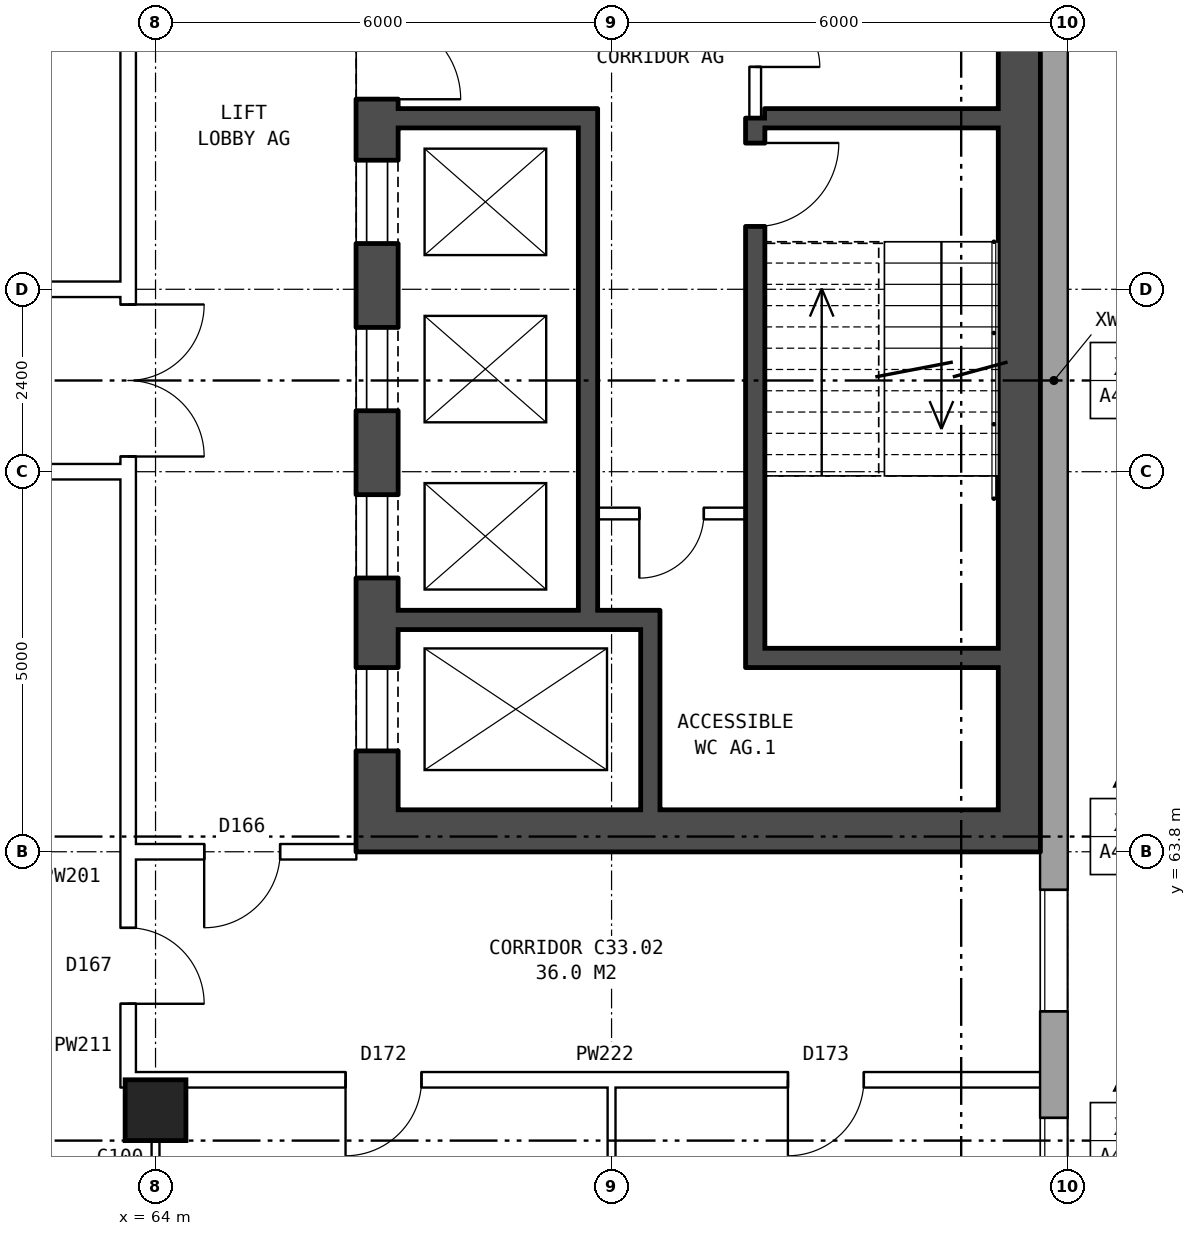
"""IFC4 building model, lengths in metres.
Left out: names, types, materials, properties, quantities, classifications, styles, units other than length and angle.
Written with IfcOpenShell. Run it as: python <this file> out.ifc"""

import sys

from ifc_helpers import new_model, si_unit, direction, frame, frame_2d, origin, origin_2d, place, context, subcontext, project, spatial, rectangle, extrude, element, fill, save


model = new_model("IFC4")
c1 = context("Model", 3, precision=1e-05, world=origin(), true_north=direction((0.0, 1.0)))
c2 = subcontext(c1, "Body", "Model", "MODEL_VIEW")
j1 = project(units=[si_unit("LENGTHUNIT", "METRE"), si_unit("PLANEANGLEUNIT", "RADIAN")], contexts=[c1])
p1 = place(None, origin())
s1 = spatial("IfcSite", under=j1, at=p1, CompositionType="ELEMENT")
p2 = place(p1, origin())
s2 = spatial("IfcBuilding", under=s1, at=p2, CompositionType="ELEMENT")
p3 = place(p2, frame((0.0, 0.0, 119.5)))
s3 = spatial("IfcBuildingStorey", under=s2, at=p3, CompositionType="ELEMENT", Elevation=119.5)
p4 = place(p3, frame((64.0, 60.4, 0.0), z_axis=(0.0, 0.0, 1.0), x_axis=(1.0, 0.0, 0.0)))
e1 = element("IfcColumn", 1, at=p4, inside=s3, PredefinedType="COLUMN", context=c2, shape_type="SweptSolid", body=[
    extrude(rectangle(XDim=0.8, YDim=0.8, at=origin_2d()), origin(), (0.0, 0.0, 1.0), 3.6),
])
p5 = place(p3, frame((75.82, 57.075, 0.0), z_axis=(0.0, 0.0, 1.0), x_axis=(0.0, 1.0, 0.0)))
e2 = element("IfcWall", 2, at=p5, inside=s3, PredefinedType="STANDARD", context=c2, shape_type="SweptSolid", body=[
    extrude(rectangle(XDim=25.851, YDim=0.36, at=frame_2d((12.925, 0.0))), origin(), (0.0, 0.0, 1.0), 3.6),
])
p6 = place(p5, frame((1.625, 0.0, 0.8)))
e3 = element("IfcOpeningElement", 3, at=p6, cuts=e2, PredefinedType="OPENING", context=c2, shape_type="SweptSolid", body=[
    extrude(rectangle(XDim=1.6, YDim=1.8, at=frame_2d((0.8, 0.9))), frame((0.0, 0.19, 0.0), z_axis=(0.0, -1.0, 0.0), x_axis=(1.0, 0.0, 0.0)), (0.0, 0.0, 1.0), 0.38),
])
p7 = place(p5, frame((4.625, 0.0, 0.8)))
e4 = element("IfcOpeningElement", 4, at=p7, cuts=e2, PredefinedType="OPENING", context=c2, shape_type="SweptSolid", body=[
    extrude(rectangle(XDim=1.6, YDim=1.8, at=frame_2d((0.8, 0.9))), frame((0.0, 0.19, 0.0), z_axis=(0.0, -1.0, 0.0), x_axis=(1.0, 0.0, 0.0)), (0.0, 0.0, 1.0), 0.38),
])
p8 = place(p5, frame((19.625, 0.0, 0.8)))
e5 = element("IfcOpeningElement", 5, at=p8, cuts=e2, PredefinedType="OPENING", context=c2, shape_type="SweptSolid", body=[
    extrude(rectangle(XDim=1.6, YDim=1.8, at=frame_2d((0.8, 0.9))), frame((0.0, 0.19, 0.0), z_axis=(0.0, -1.0, 0.0), x_axis=(1.0, 0.0, 0.0)), (0.0, 0.0, 1.0), 0.38),
])
p9 = place(p5, frame((22.625, 0.0, 0.8)))
e6 = element("IfcOpeningElement", 6, at=p9, cuts=e2, PredefinedType="OPENING", context=c2, shape_type="SweptSolid", body=[
    extrude(rectangle(XDim=1.6, YDim=1.8, at=frame_2d((0.8, 0.9))), frame((0.0, 0.19, 0.0), z_axis=(0.0, -1.0, 0.0), x_axis=(1.0, 0.0, 0.0)), (0.0, 0.0, 1.0), 0.38),
])
p10 = place(p3, frame((66.915, 63.8, 0.0), z_axis=(0.0, 0.0, 1.0), x_axis=(0.0, 1.0, 0.0)))
e7 = element("IfcWall", 7, at=p10, inside=s3, PredefinedType="SHEAR", context=c2, shape_type="SweptSolid", body=[
    extrude(rectangle(XDim=12.4, YDim=0.55, at=frame_2d((6.2, 0.0))), origin(), (0.0, 0.0, 1.0), 3.6),
])
p11 = place(p10, frame((1.325, 0.0, 0.0)))
e8 = element("IfcOpeningElement", 8, at=p11, cuts=e7, PredefinedType="OPENING", context=c2, shape_type="SweptSolid", body=[
    extrude(rectangle(XDim=1.1, YDim=2.1, at=frame_2d((0.55, 1.05))), frame((0.0, 0.285, 0.0), z_axis=(0.0, -1.0, 0.0), x_axis=(1.0, 0.0, 0.0)), (0.0, 0.0, 1.0), 0.57),
])
p12 = place(p10, frame((3.6, 0.0, 0.0)))
e9 = element("IfcOpeningElement", 9, at=p12, cuts=e7, PredefinedType="OPENING", context=c2, shape_type="SweptSolid", body=[
    extrude(rectangle(XDim=1.1, YDim=2.1, at=frame_2d((0.55, 1.05))), frame((0.0, 0.285, 0.0), z_axis=(0.0, -1.0, 0.0), x_axis=(1.0, 0.0, 0.0)), (0.0, 0.0, 1.0), 0.57),
])
p13 = place(p10, frame((5.8, 0.0, 0.0)))
e10 = element("IfcOpeningElement", 10, at=p13, cuts=e7, PredefinedType="OPENING", context=c2, shape_type="SweptSolid", body=[
    extrude(rectangle(XDim=1.1, YDim=2.1, at=frame_2d((0.55, 1.05))), frame((0.0, 0.285, 0.0), z_axis=(0.0, -1.0, 0.0), x_axis=(1.0, 0.0, 0.0)), (0.0, 0.0, 1.0), 0.57),
])
p14 = place(p10, frame((8.0, 0.0, 0.0)))
e11 = element("IfcOpeningElement", 11, at=p14, cuts=e7, PredefinedType="OPENING", context=c2, shape_type="SweptSolid", body=[
    extrude(rectangle(XDim=1.1, YDim=2.1, at=frame_2d((0.55, 1.05))), frame((0.0, 0.285, 0.0), z_axis=(0.0, -1.0, 0.0), x_axis=(1.0, 0.0, 0.0)), (0.0, 0.0, 1.0), 0.57),
])
p15 = place(p10, frame((9.9, 0.0, 0.0)))
e12 = element("IfcOpeningElement", 12, at=p15, cuts=e7, PredefinedType="OPENING", context=c2, shape_type="SweptSolid", body=[
    extrude(rectangle(XDim=1.1, YDim=2.1, at=frame_2d((0.55, 1.05))), frame((0.0, 0.285, 0.0), z_axis=(0.0, -1.0, 0.0), x_axis=(1.0, 0.0, 0.0)), (0.0, 0.0, 1.0), 0.57),
])
p16 = place(p3, frame((75.365, 63.8, 0.0), z_axis=(0.0, 0.0, 1.0), x_axis=(0.0, 1.0, 0.0)))
e13 = element("IfcWall", 13, at=p16, inside=s3, PredefinedType="SHEAR", context=c2, shape_type="SweptSolid", body=[
    extrude(rectangle(XDim=12.4, YDim=0.55, at=frame_2d((6.2, 0.0))), origin(), (0.0, 0.0, 1.0), 3.6),
])
p17 = place(p3, frame((67.19, 64.075, 0.0), z_axis=(0.0, 0.0, 1.0), x_axis=(1.0, 0.0, 0.0)))
e14 = element("IfcWall", 14, at=p17, inside=s3, PredefinedType="SHEAR", context=c2, shape_type="SweptSolid", body=[
    extrude(rectangle(XDim=7.9, YDim=0.55, at=frame_2d((3.95, 0.0))), origin(), (0.0, 0.0, 1.0), 3.6),
])
p18 = place(p3, frame((72.015, 66.35, 0.0), z_axis=(0.0, 0.0, 1.0), x_axis=(1.0, 0.0, 0.0)))
e15 = element("IfcWall", 15, at=p18, inside=s3, PredefinedType="SHEAR", context=c2, shape_type="SweptSolid", body=[
    extrude(rectangle(XDim=3.075, YDim=0.25, at=frame_2d((1.538, 0.0))), origin(), (0.0, 0.0, 1.0), 3.6),
])
p19 = place(p3, frame((67.19, 66.85, 0.0), z_axis=(0.0, 0.0, 1.0), x_axis=(1.0, 0.0, 0.0)))
e16 = element("IfcWall", 16, at=p19, inside=s3, PredefinedType="SHEAR", context=c2, shape_type="SweptSolid", body=[
    extrude(rectangle(XDim=3.445, YDim=0.25, at=frame_2d((1.723, 0.0))), origin(), (0.0, 0.0, 1.0), 3.6),
])
p20 = place(p3, frame((69.815, 68.25, 0.0), z_axis=(0.0, 0.0, 1.0), x_axis=(1.0, 0.0, 0.0)))
e17 = element("IfcWall", 17, at=p20, inside=s3, PredefinedType="PARTITIONING", context=c2, shape_type="SweptSolid", body=[
    extrude(rectangle(XDim=1.95, YDim=0.15, at=frame_2d((0.975, 0.0))), origin(), (0.0, 0.0, 1.0), 3.6),
])
p21 = place(p20, frame((0.55, 0.0, 0.0)))
e18 = element("IfcOpeningElement", 18, at=p21, cuts=e17, PredefinedType="OPENING", context=c2, shape_type="SweptSolid", body=[
    extrude(rectangle(XDim=0.85, YDim=2.1, at=frame_2d((0.425, 1.05))), frame((0.0, 0.085, 0.0), z_axis=(0.0, -1.0, 0.0), x_axis=(1.0, 0.0, 0.0)), (0.0, 0.0, 1.0), 0.17),
])
p22 = place(p3, frame((67.19, 73.45, 0.0), z_axis=(0.0, 0.0, 1.0), x_axis=(1.0, 0.0, 0.0)))
e19 = element("IfcWall", 19, at=p22, inside=s3, PredefinedType="SHEAR", context=c2, shape_type="SweptSolid", body=[
    extrude(rectangle(XDim=2.375, YDim=0.25, at=frame_2d((1.188, 0.0))), origin(), (0.0, 0.0, 1.0), 3.6),
])
p23 = place(p3, frame((72.015, 73.45, 0.0), z_axis=(0.0, 0.0, 1.0), x_axis=(1.0, 0.0, 0.0)))
e20 = element("IfcWall", 20, at=p23, inside=s3, PredefinedType="SHEAR", context=c2, shape_type="SweptSolid", body=[
    extrude(rectangle(XDim=3.075, YDim=0.25, at=frame_2d((1.538, 0.0))), origin(), (0.0, 0.0, 1.0), 3.6),
])
p24 = place(p3, frame((69.69, 66.975, 0.0), z_axis=(0.0, 0.0, 1.0), x_axis=(0.0, 1.0, 0.0)))
e21 = element("IfcWall", 21, at=p24, inside=s3, PredefinedType="SHEAR", context=c2, shape_type="SweptSolid", body=[
    extrude(rectangle(XDim=6.6, YDim=0.25, at=frame_2d((3.3, 0.0))), origin(), (0.0, 0.0, 1.0), 3.6),
])
p25 = place(p3, frame((70.51, 64.35, 0.0), z_axis=(0.0, 0.0, 1.0), x_axis=(0.0, 1.0, 0.0)))
e22 = element("IfcWall", 22, at=p25, inside=s3, PredefinedType="SHEAR", context=c2, shape_type="SweptSolid", body=[
    extrude(rectangle(XDim=2.375, YDim=0.25, at=frame_2d((1.188, 0.0))), origin(), (0.0, 0.0, 1.0), 3.6),
])
p26 = place(p3, frame((71.89, 66.225, 0.0), z_axis=(0.0, 0.0, 1.0), x_axis=(0.0, 1.0, 0.0)))
e23 = element("IfcWall", 23, at=p26, inside=s3, PredefinedType="SHEAR", context=c2, shape_type="SweptSolid", body=[
    extrude(rectangle(XDim=7.225, YDim=0.25, at=frame_2d((3.612, 0.0))), origin(), (0.0, 0.0, 1.0), 3.6),
])
p27 = place(p26, frame((5.8, 0.0, 0.0)))
e24 = element("IfcOpeningElement", 24, at=p27, cuts=e23, PredefinedType="OPENING", context=c2, shape_type="SweptSolid", body=[
    extrude(rectangle(XDim=1.1, YDim=2.1, at=frame_2d((0.55, 1.05))), frame((0.0, 0.135, 0.0), z_axis=(0.0, -1.0, 0.0), x_axis=(1.0, 0.0, 0.0)), (0.0, 0.0, 1.0), 0.27),
])
p28 = place(p3, frame((71.89, 73.45, 0.0), z_axis=(0.0, 0.0, 1.0), x_axis=(0.0, 1.0, 0.0)))
e25 = element("IfcWall", 25, at=p28, inside=s3, PredefinedType="PARTITIONING", context=c2, shape_type="SweptSolid", body=[
    extrude(rectangle(XDim=2.2, YDim=0.15, at=frame_2d((1.1, 0.0))), origin(), (0.0, 0.0, 1.0), 3.6),
])
p29 = place(p28, frame((0.675, 0.0, 0.0)))
e26 = element("IfcOpeningElement", 26, at=p29, cuts=e25, PredefinedType="OPENING", context=c2, shape_type="SweptSolid", body=[
    extrude(rectangle(XDim=0.85, YDim=2.1, at=frame_2d((0.425, 1.05))), frame((0.0, 0.085, 0.0), z_axis=(0.0, -1.0, 0.0), x_axis=(1.0, 0.0, 0.0)), (0.0, 0.0, 1.0), 0.17),
])
p30 = place(p3, frame((63.64, 63.9, 0.0), z_axis=(0.0, 0.0, 1.0), x_axis=(0.0, 1.0, 0.0)))
e27 = element("IfcWall", 27, at=p30, inside=s3, PredefinedType="PARTITIONING", context=c2, shape_type="SweptSolid", body=[
    extrude(rectangle(XDim=12.2, YDim=0.2, at=frame_2d((6.1, 0.0))), origin(), (0.0, 0.0, 1.0), 3.6),
])
p31 = place(p30, frame((5.1, 0.0, 0.0)))
e28 = element("IfcOpeningElement", 28, at=p31, cuts=e27, PredefinedType="OPENING", context=c2, shape_type="SweptSolid", body=[
    extrude(rectangle(XDim=2.0, YDim=2.1, at=frame_2d((1.0, 1.05))), frame((0.0, 0.11, 0.0), z_axis=(0.0, -1.0, 0.0), x_axis=(1.0, 0.0, 0.0)), (0.0, 0.0, 1.0), 0.22),
])
p32 = place(p3, frame((63.54, 60.8, 0.0), z_axis=(0.0, 0.0, 1.0), x_axis=(1.0, 0.0, 0.0)))
e29 = element("IfcWall", 29, at=p32, inside=s3, PredefinedType="PARTITIONING", context=c2, shape_type="SweptSolid", body=[
    extrude(rectangle(XDim=12.22, YDim=0.2, at=frame_2d((6.11, 0.0))), origin(), (0.0, 0.0, 1.0), 3.6),
])
p33 = place(p32, frame((2.96, 0.0, 0.0)))
e30 = element("IfcOpeningElement", 30, at=p33, cuts=e29, PredefinedType="OPENING", context=c2, shape_type="SweptSolid", body=[
    extrude(rectangle(XDim=1.0, YDim=2.1, at=frame_2d((0.5, 1.05))), frame((0.0, 0.11, 0.0), z_axis=(0.0, -1.0, 0.0), x_axis=(1.0, 0.0, 0.0)), (0.0, 0.0, 1.0), 0.22),
])
p34 = place(p32, frame((8.78, 0.0, 0.0)))
e31 = element("IfcOpeningElement", 31, at=p34, cuts=e29, PredefinedType="OPENING", context=c2, shape_type="SweptSolid", body=[
    extrude(rectangle(XDim=1.0, YDim=2.1, at=frame_2d((0.5, 1.05))), frame((0.0, 0.11, 0.0), z_axis=(0.0, -1.0, 0.0), x_axis=(1.0, 0.0, 0.0)), (0.0, 0.0, 1.0), 0.22),
])
p35 = place(p3, frame((63.54, 63.8, 0.0), z_axis=(0.0, 0.0, 1.0), x_axis=(1.0, 0.0, 0.0)))
e32 = element("IfcWall", 32, at=p35, inside=s3, PredefinedType="PARTITIONING", context=c2, shape_type="SweptSolid", body=[
    extrude(rectangle(XDim=3.1, YDim=0.2, at=frame_2d((1.55, 0.0))), origin(), (0.0, 0.0, 1.0), 3.6),
])
p36 = place(p35, frame((1.1, 0.0, 0.0)))
e33 = element("IfcOpeningElement", 33, at=p36, cuts=e32, PredefinedType="OPENING", context=c2, shape_type="SweptSolid", body=[
    extrude(rectangle(XDim=1.0, YDim=2.1, at=frame_2d((0.5, 1.05))), frame((0.0, 0.11, 0.0), z_axis=(0.0, -1.0, 0.0), x_axis=(1.0, 0.0, 0.0)), (0.0, 0.0, 1.0), 0.22),
])
p37 = place(p3, frame((44.36, 68.8, 0.0), z_axis=(0.0, 0.0, 1.0), x_axis=(1.0, 0.0, 0.0)))
e34 = element("IfcWall", 34, at=p37, inside=s3, PredefinedType="PARTITIONING", context=c2, shape_type="SweptSolid", body=[
    extrude(rectangle(XDim=19.28, YDim=0.2, at=frame_2d((9.64, 0.0))), origin(), (0.0, 0.0, 1.0), 3.6),
])
p38 = place(p37, frame((4.92, 0.0, 0.0)))
e35 = element("IfcOpeningElement", 35, at=p38, cuts=e34, PredefinedType="OPENING", context=c2, shape_type="SweptSolid", body=[
    extrude(rectangle(XDim=1.8, YDim=2.1, at=frame_2d((0.9, 1.05))), frame((0.0, 0.11, 0.0), z_axis=(0.0, -1.0, 0.0), x_axis=(1.0, 0.0, 0.0)), (0.0, 0.0, 1.0), 0.22),
])
p39 = place(p3, frame((44.36, 71.2, 0.0), z_axis=(0.0, 0.0, 1.0), x_axis=(1.0, 0.0, 0.0)))
e36 = element("IfcWall", 36, at=p39, inside=s3, PredefinedType="PARTITIONING", context=c2, shape_type="SweptSolid", body=[
    extrude(rectangle(XDim=19.28, YDim=0.2, at=frame_2d((9.64, 0.0))), origin(), (0.0, 0.0, 1.0), 3.6),
])
p40 = place(p39, frame((9.14, 0.0, 0.0)))
e37 = element("IfcOpeningElement", 37, at=p40, cuts=e36, PredefinedType="OPENING", context=c2, shape_type="SweptSolid", body=[
    extrude(rectangle(XDim=1.0, YDim=2.1, at=frame_2d((0.5, 1.05))), frame((0.0, 0.11, 0.0), z_axis=(0.0, -1.0, 0.0), x_axis=(1.0, 0.0, 0.0)), (0.0, 0.0, 1.0), 0.22),
])
p41 = place(p3, frame((63.64, 60.7, 0.0), z_axis=(0.0, 0.0, 1.0), x_axis=(0.0, 1.0, 0.0)))
e38 = element("IfcWall", 38, at=p41, inside=s3, PredefinedType="PARTITIONING", context=c2, shape_type="SweptSolid", body=[
    extrude(rectangle(XDim=3.2, YDim=0.2, at=frame_2d((1.6, 0.0))), origin(), (0.0, 0.0, 1.0), 3.6),
])
p42 = place(p41, frame((1.1, 0.0, 0.0)))
e39 = element("IfcOpeningElement", 39, at=p42, cuts=e38, PredefinedType="OPENING", context=c2, shape_type="SweptSolid", body=[
    extrude(rectangle(XDim=1.0, YDim=2.1, at=frame_2d((0.5, 1.05))), frame((0.0, 0.11, 0.0), z_axis=(0.0, -1.0, 0.0), x_axis=(1.0, 0.0, 0.0)), (0.0, 0.0, 1.0), 0.22),
])
for number, where, z_axis, x_axis in (
    (40, (64.0, 54.24, 0.0), (0.0, 0.0, 1.0), (0.0, 1.0, 0.0)),
    (41, (70.0, 54.24, 0.0), (0.0, 0.0, 1.0), (0.0, 1.0, 0.0)),
):
    element("IfcWall", number, at=place(p3, frame(where, z_axis=z_axis, x_axis=x_axis)), inside=s3, PredefinedType="PARTITIONING", context=c2, shape_type="SweptSolid", body=[
        extrude(rectangle(XDim=6.66, YDim=0.1, at=frame_2d((3.33, 0.0))), origin(), (0.0, 0.0, 1.0), 3.6),
    ])
p43 = place(p6, origin())
e42 = element("IfcWindow", 42, at=p43, inside=s3, PartitioningType="SINGLE_PANEL", PredefinedType="WINDOW", context=c2, shape_type="SweptSolid", body=[
    extrude(rectangle(XDim=1.6, YDim=1.8, at=frame_2d((0.8, 0.9))), frame((0.0, 0.15, 0.0), z_axis=(0.0, -1.0, 0.0), x_axis=(1.0, 0.0, 0.0)), (0.0, 0.0, 1.0), 0.06),
])
fill(e3, e42)
p44 = place(p7, origin())
e43 = element("IfcWindow", 43, at=p44, inside=s3, PartitioningType="SINGLE_PANEL", PredefinedType="WINDOW", context=c2, shape_type="SweptSolid", body=[
    extrude(rectangle(XDim=1.6, YDim=1.8, at=frame_2d((0.8, 0.9))), frame((0.0, 0.15, 0.0), z_axis=(0.0, -1.0, 0.0), x_axis=(1.0, 0.0, 0.0)), (0.0, 0.0, 1.0), 0.06),
])
fill(e4, e43)
p45 = place(p11, origin())
e44 = element("IfcDoor", 44, at=p45, inside=s3, OperationType="DOUBLE_DOOR_SLIDING", PredefinedType="DOOR", context=c2, shape_type="SweptSolid", body=[
    extrude(rectangle(XDim=1.1, YDim=2.1, at=frame_2d((0.55, 1.05))), frame((0.0, -0.21, 0.0), z_axis=(0.0, -1.0, 0.0), x_axis=(1.0, 0.0, 0.0)), (0.0, 0.0, 1.0), 0.05),
])
fill(e8, e44)
p46 = place(p12, origin())
e45 = element("IfcDoor", 45, at=p46, inside=s3, OperationType="DOUBLE_DOOR_SLIDING", PredefinedType="DOOR", context=c2, shape_type="SweptSolid", body=[
    extrude(rectangle(XDim=1.1, YDim=2.1, at=frame_2d((0.55, 1.05))), frame((0.0, -0.21, 0.0), z_axis=(0.0, -1.0, 0.0), x_axis=(1.0, 0.0, 0.0)), (0.0, 0.0, 1.0), 0.05),
])
fill(e9, e45)
p47 = place(p13, origin())
e46 = element("IfcDoor", 46, at=p47, inside=s3, OperationType="DOUBLE_DOOR_SLIDING", PredefinedType="DOOR", context=c2, shape_type="SweptSolid", body=[
    extrude(rectangle(XDim=1.1, YDim=2.1, at=frame_2d((0.55, 1.05))), frame((0.0, -0.21, 0.0), z_axis=(0.0, -1.0, 0.0), x_axis=(1.0, 0.0, 0.0)), (0.0, 0.0, 1.0), 0.05),
])
fill(e10, e46)
p48 = place(p14, origin())
e47 = element("IfcDoor", 47, at=p48, inside=s3, OperationType="DOUBLE_DOOR_SLIDING", PredefinedType="DOOR", context=c2, shape_type="SweptSolid", body=[
    extrude(rectangle(XDim=1.1, YDim=2.1, at=frame_2d((0.55, 1.05))), frame((0.0, -0.21, 0.0), z_axis=(0.0, -1.0, 0.0), x_axis=(1.0, 0.0, 0.0)), (0.0, 0.0, 1.0), 0.05),
])
fill(e11, e47)
p49 = place(p15, frame((1.1, 0.0, 0.0), z_axis=(0.0, 0.0, 1.0), x_axis=(-1.0, 0.0, 0.0)))
e48 = element("IfcDoor", 48, at=p49, inside=s3, OperationType="SINGLE_SWING_RIGHT", PredefinedType="DOOR", context=c2, shape_type="SweptSolid", body=[
    extrude(rectangle(XDim=1.1, YDim=2.1, at=frame_2d((0.55, 1.05))), frame((0.0, 0.26, 0.0), z_axis=(0.0, -1.0, 0.0), x_axis=(1.0, 0.0, 0.0)), (0.0, 0.0, 1.0), 0.05),
])
fill(e12, e48)
p50 = place(p27, frame((1.1, 0.0, 0.0), z_axis=(0.0, 0.0, 1.0), x_axis=(-1.0, 0.0, 0.0)))
e49 = element("IfcDoor", 49, at=p50, inside=s3, OperationType="SINGLE_SWING_LEFT", PredefinedType="DOOR", context=c2, shape_type="SweptSolid", body=[
    extrude(rectangle(XDim=1.1, YDim=2.1, at=frame_2d((0.55, 1.05))), frame((0.0, 0.025, 0.0), z_axis=(0.0, -1.0, 0.0), x_axis=(1.0, 0.0, 0.0)), (0.0, 0.0, 1.0), 0.05),
])
fill(e24, e49)
p51 = place(p21, frame((0.85, 0.0, 0.0), z_axis=(0.0, 0.0, 1.0), x_axis=(-1.0, 0.0, 0.0)))
e50 = element("IfcDoor", 50, at=p51, inside=s3, OperationType="SINGLE_SWING_RIGHT", PredefinedType="DOOR", context=c2, shape_type="SweptSolid", body=[
    extrude(rectangle(XDim=0.85, YDim=2.1, at=frame_2d((0.425, 1.05))), frame((0.0, 0.025, 0.0), z_axis=(0.0, -1.0, 0.0), x_axis=(1.0, 0.0, 0.0)), (0.0, 0.0, 1.0), 0.05),
])
fill(e18, e50)
p52 = place(p29, frame((0.85, 0.0, 0.0), z_axis=(0.0, 0.0, 1.0), x_axis=(-1.0, 0.0, 0.0)))
e51 = element("IfcDoor", 51, at=p52, inside=s3, OperationType="SINGLE_SWING_RIGHT", PredefinedType="DOOR", context=c2, shape_type="SweptSolid", body=[
    extrude(rectangle(XDim=0.85, YDim=2.1, at=frame_2d((0.425, 1.05))), frame((0.0, 0.025, 0.0), z_axis=(0.0, -1.0, 0.0), x_axis=(1.0, 0.0, 0.0)), (0.0, 0.0, 1.0), 0.05),
])
fill(e26, e51)
p53 = place(p31, frame((2.0, 0.0, 0.0), z_axis=(0.0, 0.0, 1.0), x_axis=(-1.0, 0.0, 0.0)))
e52 = element("IfcDoor", 52, at=p53, inside=s3, OperationType="DOUBLE_DOOR_SINGLE_SWING", PredefinedType="DOOR", context=c2, shape_type="SweptSolid", body=[
    extrude(rectangle(XDim=2.0, YDim=2.1, at=frame_2d((1.0, 1.05))), frame((0.0, 0.025, 0.0), z_axis=(0.0, -1.0, 0.0), x_axis=(1.0, 0.0, 0.0)), (0.0, 0.0, 1.0), 0.05),
])
fill(e28, e52)
p54 = place(p33, frame((1.0, 0.0, 0.0), z_axis=(0.0, 0.0, 1.0), x_axis=(-1.0, 0.0, 0.0)))
e53 = element("IfcDoor", 53, at=p54, inside=s3, OperationType="SINGLE_SWING_RIGHT", PredefinedType="DOOR", context=c2, shape_type="SweptSolid", body=[
    extrude(rectangle(XDim=1.0, YDim=2.1, at=frame_2d((0.5, 1.05))), frame((0.0, 0.025, 0.0), z_axis=(0.0, -1.0, 0.0), x_axis=(1.0, 0.0, 0.0)), (0.0, 0.0, 1.0), 0.05),
])
fill(e30, e53)
p55 = place(p34, frame((1.0, 0.0, 0.0), z_axis=(0.0, 0.0, 1.0), x_axis=(-1.0, 0.0, 0.0)))
e54 = element("IfcDoor", 54, at=p55, inside=s3, OperationType="SINGLE_SWING_RIGHT", PredefinedType="DOOR", context=c2, shape_type="SweptSolid", body=[
    extrude(rectangle(XDim=1.0, YDim=2.1, at=frame_2d((0.5, 1.05))), frame((0.0, 0.025, 0.0), z_axis=(0.0, -1.0, 0.0), x_axis=(1.0, 0.0, 0.0)), (0.0, 0.0, 1.0), 0.05),
])
fill(e31, e54)
p56 = place(p36, frame((1.0, 0.0, 0.0), z_axis=(0.0, 0.0, 1.0), x_axis=(-1.0, 0.0, 0.0)))
e55 = element("IfcDoor", 55, at=p56, inside=s3, OperationType="SINGLE_SWING_RIGHT", PredefinedType="DOOR", context=c2, shape_type="SweptSolid", body=[
    extrude(rectangle(XDim=1.0, YDim=2.1, at=frame_2d((0.5, 1.05))), frame((0.0, 0.025, 0.0), z_axis=(0.0, -1.0, 0.0), x_axis=(1.0, 0.0, 0.0)), (0.0, 0.0, 1.0), 0.05),
])
fill(e33, e55)
p57 = place(p42, frame((1.0, 0.0, 0.0), z_axis=(0.0, 0.0, 1.0), x_axis=(-1.0, 0.0, 0.0)))
e56 = element("IfcDoor", 56, at=p57, inside=s3, OperationType="SINGLE_SWING_RIGHT", PredefinedType="DOOR", context=c2, shape_type="SweptSolid", body=[
    extrude(rectangle(XDim=1.0, YDim=2.1, at=frame_2d((0.5, 1.05))), frame((0.0, 0.025, 0.0), z_axis=(0.0, -1.0, 0.0), x_axis=(1.0, 0.0, 0.0)), (0.0, 0.0, 1.0), 0.05),
])
fill(e39, e56)
save(model, sys.argv[1])
